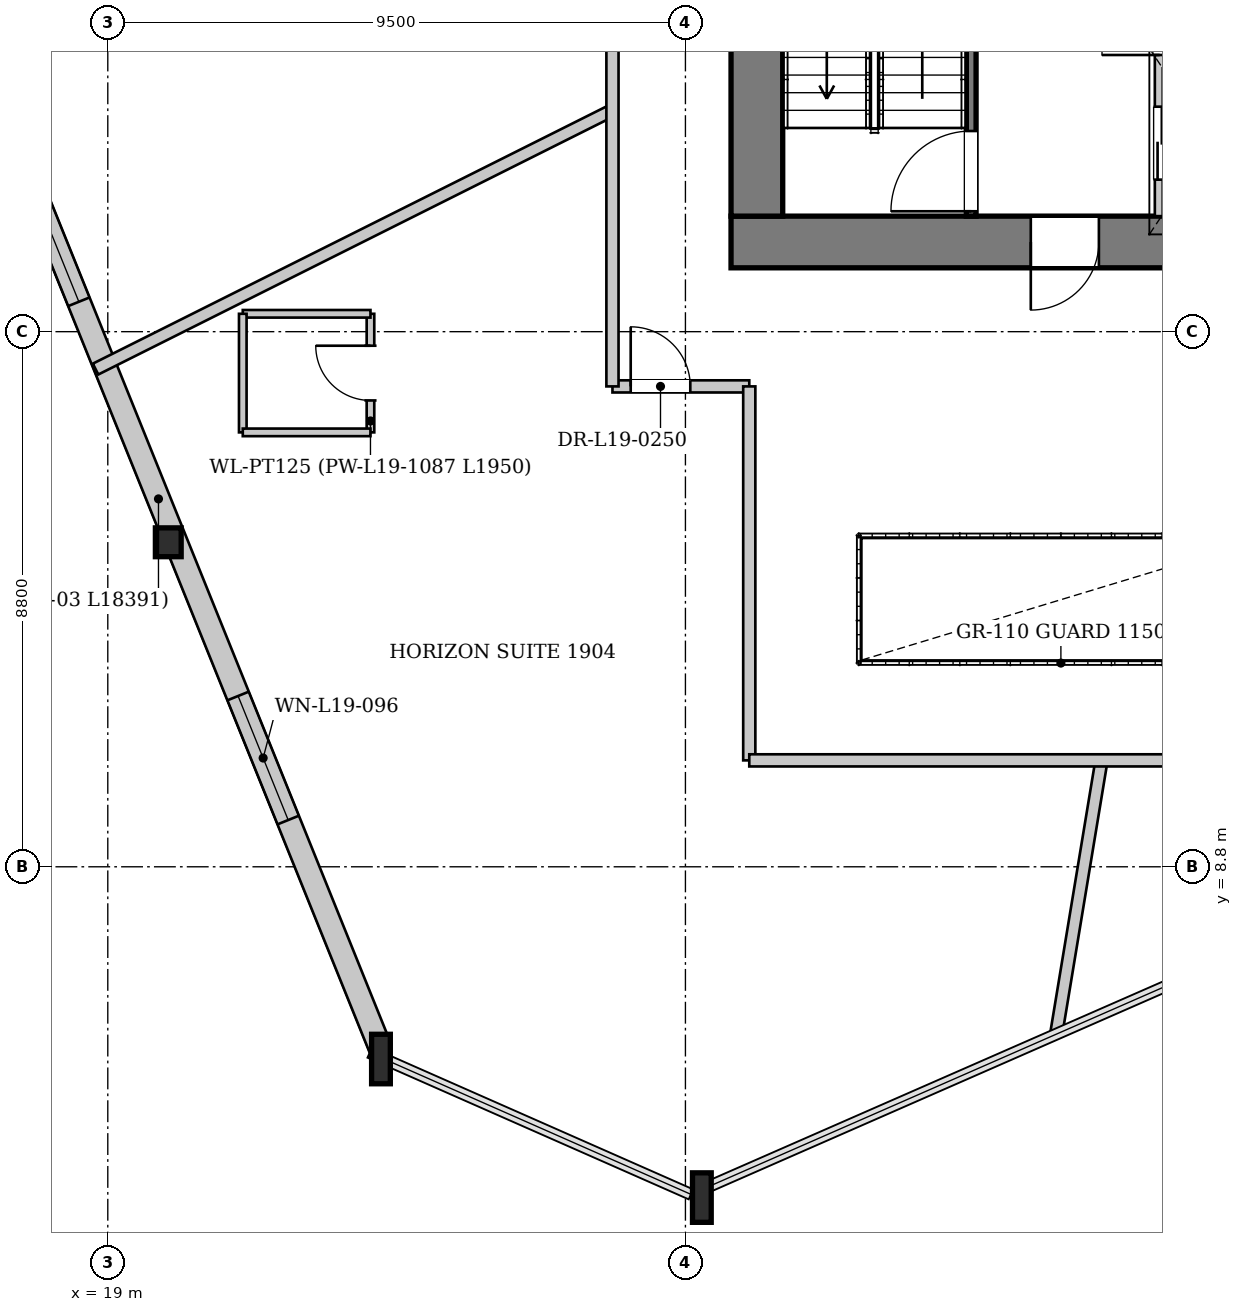
"""IFC4 building model, lengths in metres.
Left out: names, types, materials, properties, quantities, classifications, styles, units other than length and angle.
Written with IfcOpenShell. Run it as: python <this file> out.ifc"""

import sys

from ifc_helpers import new_model, si_unit, direction, frame, frame_2d, origin, origin_2d, place, context, subcontext, project, spatial, rectangle, i_section, extrude, source, transform, mapped, element, fill, save


model = new_model("IFC4")
c1 = context("Model", 3, precision=1e-05, world=origin(), true_north=direction((0.0, 1.0)))
c2 = subcontext(c1, "Body", "Model", "MODEL_VIEW")
j1 = project(units=[si_unit("LENGTHUNIT", "METRE"), si_unit("PLANEANGLEUNIT", "RADIAN")], contexts=[c1])
p1 = place(None, origin())
s1 = spatial("IfcSite", under=j1, at=p1, CompositionType="ELEMENT")
p2 = place(p1, origin())
s2 = spatial("IfcBuilding", under=s1, at=p2, CompositionType="ELEMENT")
p3 = place(p2, frame((0.0, 0.0, 75.9)))
s3 = spatial("IfcBuildingStorey", under=s2, at=p3, CompositionType="ELEMENT", Elevation=75.9)
m1 = source(origin(), c2, "Body", "SweptSolid", [
    extrude(i_section(OverallWidth=0.424, OverallDepth=0.474, WebThickness=0.043, FlangeThickness=0.068, at=origin_2d()), origin(), (0.0, 0.0, 1.0), 3.853),
])
p4 = place(p3, frame((19.863, 14.269, 0.0), z_axis=(0.068236458654, -0.068870037657, 0.995289256258), x_axis=(0.710366787942, 0.703831674897, 0.0)))
e1 = element("IfcColumn", 1, at=p4, inside=s3, PredefinedType="COLUMN", context=c2, shape_type="MappedRepresentation", body=[
    mapped(m1, transform((0.0, 0.0, 0.0), x_axis=(1.0, 0.0, 0.0), y_axis=(0.0, 1.0, 0.0), z_axis=(0.0, 0.0, 1.0), scale=1.0)),
])
m2 = source(origin(), c2, "Body", "SweptSolid", [
    extrude(i_section(OverallWidth=0.308, OverallDepth=0.814, WebThickness=0.021, FlangeThickness=0.04, at=origin_2d()), origin(), (0.0, 0.0, 1.0), 3.859),
])
p5 = place(p3, frame((23.307, 5.743, 0.0), z_axis=(0.096105328977, -0.054284642701, 0.993889804409), x_axis=(0.491811694225, 0.870701589193, 0.0)))
e2 = element("IfcColumn", 2, at=p5, inside=s3, PredefinedType="COLUMN", context=c2, shape_type="MappedRepresentation", body=[
    mapped(m2, transform((0.0, 0.0, 0.0), x_axis=(1.0, 0.0, 0.0), y_axis=(0.0, 1.0, 0.0), z_axis=(0.0, 0.0, 1.0), scale=1.0)),
])
m3 = source(origin(), c2, "Body", "SweptSolid", [
    extrude(i_section(OverallWidth=0.308, OverallDepth=0.814, WebThickness=0.021, FlangeThickness=0.04, at=origin_2d()), origin(), (0.0, 0.0, 1.0), 3.854),
])
p6 = place(p3, frame((28.59, 3.413, 0.0), z_axis=(0.093322917566, -0.027559721073, 0.995254386994), x_axis=(0.283223653581, 0.959053889024, 0.0)))
e3 = element("IfcColumn", 3, at=p6, inside=s3, PredefinedType="COLUMN", context=c2, shape_type="MappedRepresentation", body=[
    mapped(m3, transform((0.0, 0.0, 0.0), x_axis=(1.0, 0.0, 0.0), y_axis=(0.0, 1.0, 0.0), z_axis=(0.0, 0.0, 1.0), scale=1.0)),
])
p7 = place(p3, frame((23.483, 5.814, 0.0), z_axis=(0.0, 0.0, 1.0), x_axis=(-0.374542504412, 0.927209745629, 0.0)))
e4 = element("IfcWall", 4, at=p7, inside=s3, PredefinedType="SOLIDWALL", context=c2, shape_type="SweptSolid", body=[
    extrude(rectangle(XDim=18.391, YDim=0.38, at=frame_2d((9.195, 0.0))), origin(), (0.0, 0.0, 1.0), 2.872),
])
p8 = place(p7, frame((4.049, 0.0, 0.502)))
e5 = element("IfcOpeningElement", 5, at=p8, cuts=e4, PredefinedType="OPENING", context=c2, shape_type="SweptSolid", body=[
    extrude(rectangle(XDim=2.2, YDim=2.25, at=frame_2d((1.1, 1.125))), frame((0.0, 0.2, 0.0), z_axis=(0.0, -1.0, 0.0), x_axis=(1.0, 0.0, 0.0)), (0.0, 0.0, 1.0), 0.4),
])
p9 = place(p7, frame((13.241, 0.0, 0.502)))
e6 = element("IfcOpeningElement", 6, at=p9, cuts=e4, PredefinedType="OPENING", context=c2, shape_type="SweptSolid", body=[
    extrude(rectangle(XDim=2.2, YDim=2.25, at=frame_2d((1.1, 1.125))), frame((0.0, 0.2, 0.0), z_axis=(0.0, -1.0, 0.0), x_axis=(1.0, 0.0, 0.0)), (0.0, 0.0, 1.0), 0.4),
])
p10 = place(p3, frame((46.75, 19.075, 0.0), z_axis=(0.0, 0.0, 1.0), x_axis=(-1.0, 0.0, 0.0)))
e7 = element("IfcWall", 7, at=p10, inside=s3, PredefinedType="SHEAR", context=c2, shape_type="SweptSolid", body=[
    extrude(rectangle(XDim=17.5, YDim=0.85, at=frame_2d((8.75, 0.0))), origin(), (0.0, 0.0, 1.0), 3.58),
])
p11 = place(p10, frame((4.95, 0.0, 0.0)))
e8 = element("IfcOpeningElement", 8, at=p11, cuts=e7, PredefinedType="OPENING", context=c2, shape_type="SweptSolid", body=[
    extrude(rectangle(XDim=1.12, YDim=2.25, at=frame_2d((0.56, 1.125))), frame((0.0, 0.435, 0.0), z_axis=(0.0, -1.0, 0.0), x_axis=(1.0, 0.0, 0.0)), (0.0, 0.0, 1.0), 0.87),
])
p12 = place(p10, frame((11.45, 0.0, 0.0)))
e9 = element("IfcOpeningElement", 9, at=p12, cuts=e7, PredefinedType="OPENING", context=c2, shape_type="SweptSolid", body=[
    extrude(rectangle(XDim=1.12, YDim=2.25, at=frame_2d((0.56, 1.125))), frame((0.0, 0.435, 0.0), z_axis=(0.0, -1.0, 0.0), x_axis=(1.0, 0.0, 0.0)), (0.0, 0.0, 1.0), 0.87),
])
p13 = place(p3, frame((29.675, 19.5, 0.0), z_axis=(0.0, 0.0, 1.0), x_axis=(0.0, 1.0, 0.0)))
e10 = element("IfcWall", 10, at=p13, inside=s3, PredefinedType="SHEAR", context=c2, shape_type="SweptSolid", body=[
    extrude(rectangle(XDim=14.2, YDim=0.85, at=frame_2d((7.1, 0.0))), origin(), (0.0, 0.0, 1.0), 3.58),
])
p14 = place(p13, frame((7.42, 0.0, 0.0)))
e11 = element("IfcOpeningElement", 11, at=p14, cuts=e10, PredefinedType="OPENING", context=c2, shape_type="SweptSolid", body=[
    extrude(rectangle(XDim=1.6, YDim=2.2, at=frame_2d((0.8, 1.1))), frame((0.0, 0.435, 0.0), z_axis=(0.0, -1.0, 0.0), x_axis=(1.0, 0.0, 0.0)), (0.0, 0.0, 1.0), 0.87),
])
p15 = place(p3, frame((33.2, 19.5, 0.0), z_axis=(0.0, 0.0, 1.0), x_axis=(0.0, 1.0, 0.0)))
e12 = element("IfcWall", 12, at=p15, inside=s3, PredefinedType="PARTITIONING", context=c2, shape_type="SweptSolid", body=[
    extrude(rectangle(XDim=7.46, YDim=0.16, at=frame_2d((3.73, 0.0))), origin(), (0.0, 0.0, 1.0), 3.58),
])
p16 = place(p15, frame((0.08, 0.0, 0.0)))
e13 = element("IfcOpeningElement", 13, at=p16, cuts=e12, PredefinedType="OPENING", context=c2, shape_type="SweptSolid", body=[
    extrude(rectangle(XDim=1.32, YDim=2.2, at=frame_2d((0.66, 1.1))), frame((0.0, 0.09, 0.0), z_axis=(0.0, -1.0, 0.0), x_axis=(1.0, 0.0, 0.0)), (0.0, 0.0, 1.0), 0.18),
])
p17 = place(p3, frame((36.3, 19.5, 0.0), z_axis=(0.0, 0.0, 1.0), x_axis=(0.0, 1.0, 0.0)))
e14 = element("IfcWall", 14, at=p17, inside=s3, PredefinedType="PARTITIONING", context=c2, shape_type="SweptSolid", body=[
    extrude(rectangle(XDim=4.78, YDim=0.16, at=frame_2d((2.39, 0.0))), origin(), (0.0, 0.0, 1.0), 3.58),
])
p18 = place(p17, frame((0.6, 0.0, 0.0)))
e15 = element("IfcOpeningElement", 15, at=p18, cuts=e14, PredefinedType="OPENING", context=c2, shape_type="SweptSolid", body=[
    extrude(rectangle(XDim=1.2, YDim=2.2, at=frame_2d((0.6, 1.1))), frame((0.0, 0.09, 0.0), z_axis=(0.0, -1.0, 0.0), x_axis=(1.0, 0.0, 0.0)), (0.0, 0.0, 1.0), 0.18),
])
p19 = place(p17, frame((2.65, 0.0, 0.0)))
e16 = element("IfcOpeningElement", 16, at=p19, cuts=e14, PredefinedType="OPENING", context=c2, shape_type="SweptSolid", body=[
    extrude(rectangle(XDim=0.95, YDim=2.1, at=frame_2d((0.475, 1.05))), frame((0.0, 0.09, 0.0), z_axis=(0.0, -1.0, 0.0), x_axis=(1.0, 0.0, 0.0)), (0.0, 0.0, 1.0), 0.18),
])
p20 = place(p3, frame((27.3, 21.242, 0.0), z_axis=(0.0, 0.0, 1.0), x_axis=(-0.894159980133, -0.447747618562, 0.0)))
e17 = element("IfcWall", 17, at=p20, inside=s3, PredefinedType="PARTITIONING", context=c2, shape_type="SweptSolid", body=[
    extrude(rectangle(XDim=9.508, YDim=0.2, at=frame_2d((4.754, 0.0))), origin(), (0.0, 0.0, 1.0), 3.58),
])
p21 = place(p3, frame((35.343, 10.55, 0.0), z_axis=(0.0, 0.0, 1.0), x_axis=(-0.163323758673, -0.986572526403, 0.0)))
e18 = element("IfcWall", 18, at=p21, inside=s3, PredefinedType="PARTITIONING", context=c2, shape_type="SweptSolid", body=[
    extrude(rectangle(XDim=4.529, YDim=0.2, at=frame_2d((2.265, 0.0))), origin(), (0.0, 0.0, 1.0), 3.58),
])
p22 = place(p3, frame((23.32, 15.944, 0.0), z_axis=(0.0, 0.0, 1.0), x_axis=(0.0, 1.0, 0.0)))
e19 = element("IfcWall", 19, at=p22, inside=s3, PredefinedType="PARTITIONING", context=c2, shape_type="SweptSolid", body=[
    extrude(rectangle(XDim=1.95, YDim=0.125, at=frame_2d((0.975, 0.0))), origin(), (0.0, 0.0, 1.0), 3.58),
])
p23 = place(p22, frame((0.525, 0.0, 0.0)))
e20 = element("IfcOpeningElement", 20, at=p23, cuts=e19, PredefinedType="OPENING", context=c2, shape_type="SweptSolid", body=[
    extrude(rectangle(XDim=0.9, YDim=2.1, at=frame_2d((0.45, 1.05))), frame((0.0, 0.073, 0.0), z_axis=(0.0, -1.0, 0.0), x_axis=(1.0, 0.0, 0.0)), (0.0, 0.0, 1.0), 0.145),
])
p24 = place(p3, frame((23.32, 17.894, 0.0), z_axis=(0.0, 0.0, 1.0), x_axis=(-1.0, 0.0, 0.0)))
e21 = element("IfcWall", 21, at=p24, inside=s3, PredefinedType="PARTITIONING", context=c2, shape_type="SweptSolid", body=[
    extrude(rectangle(XDim=2.1, YDim=0.125, at=frame_2d((1.05, 0.0))), origin(), (0.0, 0.0, 1.0), 3.58),
])
p25 = place(p3, frame((21.22, 17.894, 0.0), z_axis=(0.0, 0.0, 1.0), x_axis=(0.0, -1.0, 0.0)))
e22 = element("IfcWall", 22, at=p25, inside=s3, PredefinedType="PARTITIONING", context=c2, shape_type="SweptSolid", body=[
    extrude(rectangle(XDim=1.95, YDim=0.125, at=frame_2d((0.975, 0.0))), origin(), (0.0, 0.0, 1.0), 3.58),
])
p26 = place(p3, frame((21.22, 15.944, 0.0), z_axis=(0.0, 0.0, 1.0), x_axis=(1.0, 0.0, 0.0)))
e23 = element("IfcWall", 23, at=p26, inside=s3, PredefinedType="PARTITIONING", context=c2, shape_type="SweptSolid", body=[
    extrude(rectangle(XDim=2.1, YDim=0.125, at=frame_2d((1.05, 0.0))), origin(), (0.0, 0.0, 1.0), 3.58),
])
p27 = place(p3, frame((27.3, 16.7, 0.0), z_axis=(0.0, 0.0, 1.0), x_axis=(1.0, 0.0, 0.0)))
e24 = element("IfcWall", 24, at=p27, inside=s3, PredefinedType="PARTITIONING", context=c2, shape_type="SweptSolid", body=[
    extrude(rectangle(XDim=2.25, YDim=0.2, at=frame_2d((1.125, 0.0))), origin(), (0.0, 0.0, 1.0), 3.58),
])
p28 = place(p27, frame((0.3, 0.0, 0.0)))
e25 = element("IfcOpeningElement", 25, at=p28, cuts=e24, PredefinedType="OPENING", context=c2, shape_type="SweptSolid", body=[
    extrude(rectangle(XDim=0.98, YDim=2.15, at=frame_2d((0.49, 1.075))), frame((0.0, 0.11, 0.0), z_axis=(0.0, -1.0, 0.0), x_axis=(1.0, 0.0, 0.0)), (0.0, 0.0, 1.0), 0.22),
])
p29 = place(p3, frame((27.3, 16.7, 0.0), z_axis=(0.0, 0.0, 1.0), x_axis=(0.0, 1.0, 0.0)))
e26 = element("IfcWall", 26, at=p29, inside=s3, PredefinedType="PARTITIONING", context=c2, shape_type="SweptSolid", body=[
    extrude(rectangle(XDim=19.8, YDim=0.2, at=frame_2d((9.9, 0.0))), origin(), (0.0, 0.0, 1.0), 3.58),
])
p30 = place(p29, frame((18.52, 0.0, 0.0)))
e27 = element("IfcOpeningElement", 27, at=p30, cuts=e26, PredefinedType="OPENING", context=c2, shape_type="SweptSolid", body=[
    extrude(rectangle(XDim=0.98, YDim=2.15, at=frame_2d((0.49, 1.075))), frame((0.0, 0.11, 0.0), z_axis=(0.0, -1.0, 0.0), x_axis=(1.0, 0.0, 0.0)), (0.0, 0.0, 1.0), 0.22),
])
p31 = place(p29, frame((10.098, 0.0, 0.0)))
e28 = element("IfcOpeningElement", 28, at=p31, cuts=e26, PredefinedType="OPENING", context=c2, shape_type="SweptSolid", body=[
    extrude(rectangle(XDim=0.98, YDim=2.15, at=frame_2d((0.49, 1.075))), frame((0.0, 0.11, 0.0), z_axis=(0.0, -1.0, 0.0), x_axis=(1.0, 0.0, 0.0)), (0.0, 0.0, 1.0), 0.22),
])
p32 = place(p3, frame((29.55, 10.55, 0.0), z_axis=(0.0, 0.0, 1.0), x_axis=(0.0, 1.0, 0.0)))
e29 = element("IfcWall", 29, at=p32, inside=s3, PredefinedType="PARTITIONING", context=c2, shape_type="SweptSolid", body=[
    extrude(rectangle(XDim=6.15, YDim=0.2, at=frame_2d((3.075, 0.0))), origin(), (0.0, 0.0, 1.0), 3.58),
])
p33 = place(p3, frame((29.55, 10.55, 0.0), z_axis=(0.0, 0.0, 1.0), x_axis=(1.0, 0.0, 0.0)))
e30 = element("IfcWall", 30, at=p33, inside=s3, PredefinedType="PARTITIONING", context=c2, shape_type="SweptSolid", body=[
    extrude(rectangle(XDim=10.3, YDim=0.2, at=frame_2d((5.15, 0.0))), origin(), (0.0, 0.0, 1.0), 3.205),
])
m4 = source(origin(), c2, "Body", "SweptSolid", [
    extrude(rectangle(XDim=2.2, YDim=2.25, at=frame_2d((1.1, 1.125))), frame((0.0, 0.03, 0.0), z_axis=(0.0, -1.0, 0.0), x_axis=(1.0, 0.0, 0.0)), (0.0, 0.0, 1.0), 0.06),
])
p34 = place(p8, origin())
e31 = element("IfcWindow", 31, at=p34, inside=s3, PartitioningType="SINGLE_PANEL", PredefinedType="WINDOW", context=c2, shape_type="MappedRepresentation", body=[
    mapped(m4, transform((0.0, 0.0, 0.0), x_axis=(1.0, 0.0, 0.0), y_axis=(0.0, 1.0, 0.0), z_axis=(0.0, 0.0, 1.0), scale=1.0)),
])
fill(e5, e31)
p35 = place(p9, origin())
e32 = element("IfcWindow", 32, at=p35, inside=s3, PartitioningType="SINGLE_PANEL", PredefinedType="WINDOW", context=c2, shape_type="MappedRepresentation", body=[
    mapped(m4, transform((0.0, 0.0, 0.0), x_axis=(1.0, 0.0, 0.0), y_axis=(0.0, 1.0, 0.0), z_axis=(0.0, 0.0, 1.0), scale=1.0)),
])
fill(e6, e32)
m5 = source(origin(), c2, "Body", "SweptSolid", [
    extrude(rectangle(XDim=1.12, YDim=2.25, at=frame_2d((0.56, 1.125))), frame((0.0, 0.025, 0.0), z_axis=(0.0, -1.0, 0.0), x_axis=(1.0, 0.0, 0.0)), (0.0, 0.0, 1.0), 0.05),
])
p36 = place(p12, origin())
e33 = element("IfcDoor", 33, at=p36, inside=s3, OperationType="SINGLE_SWING_RIGHT", PredefinedType="DOOR", context=c2, shape_type="MappedRepresentation", body=[
    mapped(m5, transform((0.0, 0.0, 0.0), x_axis=(1.0, 0.0, 0.0), y_axis=(0.0, 1.0, 0.0), z_axis=(0.0, 0.0, 1.0), scale=1.0)),
])
fill(e9, e33)
m6 = source(origin(), c2, "Body", "SweptSolid", [
    extrude(rectangle(XDim=1.32, YDim=2.2, at=frame_2d((0.66, 1.1))), frame((0.0, 0.025, 0.0), z_axis=(0.0, -1.0, 0.0), x_axis=(1.0, 0.0, 0.0)), (0.0, 0.0, 1.0), 0.05),
])
p37 = place(p16, origin())
e34 = element("IfcDoor", 34, at=p37, inside=s3, OperationType="SINGLE_SWING_LEFT", PredefinedType="DOOR", context=c2, shape_type="MappedRepresentation", body=[
    mapped(m6, transform((0.0, 0.0, 0.0), x_axis=(1.0, 0.0, 0.0), y_axis=(0.0, 1.0, 0.0), z_axis=(0.0, 0.0, 1.0), scale=1.0)),
])
fill(e13, e34)
m7 = source(origin(), c2, "Body", "SweptSolid", [
    extrude(rectangle(XDim=1.2, YDim=2.2, at=frame_2d((0.6, 1.1))), frame((0.0, 0.025, 0.0), z_axis=(0.0, -1.0, 0.0), x_axis=(1.0, 0.0, 0.0)), (0.0, 0.0, 1.0), 0.05),
])
p38 = place(p18, origin())
e35 = element("IfcDoor", 35, at=p38, inside=s3, OperationType="DOUBLE_DOOR_SLIDING", PredefinedType="DOOR", context=c2, shape_type="MappedRepresentation", body=[
    mapped(m7, transform((0.0, 0.0, 0.0), x_axis=(1.0, 0.0, 0.0), y_axis=(0.0, 1.0, 0.0), z_axis=(0.0, 0.0, 1.0), scale=1.0)),
])
fill(e15, e35)
m8 = source(origin(), c2, "Body", "SweptSolid", [
    extrude(rectangle(XDim=0.95, YDim=2.1, at=frame_2d((0.475, 1.05))), frame((0.0, 0.025, 0.0), z_axis=(0.0, -1.0, 0.0), x_axis=(1.0, 0.0, 0.0)), (0.0, 0.0, 1.0), 0.05),
])
p39 = place(p19, origin())
e36 = element("IfcDoor", 36, at=p39, inside=s3, OperationType="SINGLE_SWING_LEFT", PredefinedType="DOOR", context=c2, shape_type="MappedRepresentation", body=[
    mapped(m8, transform((0.0, 0.0, 0.0), x_axis=(1.0, 0.0, 0.0), y_axis=(0.0, 1.0, 0.0), z_axis=(0.0, 0.0, 1.0), scale=1.0)),
])
fill(e16, e36)
m9 = source(origin(), c2, "Body", "SweptSolid", [
    extrude(rectangle(XDim=0.9, YDim=2.1, at=frame_2d((0.45, 1.05))), frame((0.0, 0.025, 0.0), z_axis=(0.0, -1.0, 0.0), x_axis=(1.0, 0.0, 0.0)), (0.0, 0.0, 1.0), 0.05),
])
p40 = place(p23, origin())
e37 = element("IfcDoor", 37, at=p40, inside=s3, OperationType="SINGLE_SWING_RIGHT", PredefinedType="DOOR", context=c2, shape_type="MappedRepresentation", body=[
    mapped(m9, transform((0.0, 0.0, 0.0), x_axis=(1.0, 0.0, 0.0), y_axis=(0.0, 1.0, 0.0), z_axis=(0.0, 0.0, 1.0), scale=1.0)),
])
fill(e20, e37)
m10 = source(origin(), c2, "Body", "SweptSolid", [
    extrude(rectangle(XDim=0.98, YDim=2.15, at=frame_2d((0.49, 1.075))), frame((0.0, 0.025, 0.0), z_axis=(0.0, -1.0, 0.0), x_axis=(1.0, 0.0, 0.0)), (0.0, 0.0, 1.0), 0.05),
])
p41 = place(p28, origin())
e38 = element("IfcDoor", 38, at=p41, inside=s3, OperationType="SINGLE_SWING_LEFT", PredefinedType="DOOR", context=c2, shape_type="MappedRepresentation", body=[
    mapped(m10, transform((0.0, 0.0, 0.0), x_axis=(1.0, 0.0, 0.0), y_axis=(0.0, 1.0, 0.0), z_axis=(0.0, 0.0, 1.0), scale=1.0)),
])
fill(e25, e38)
save(model, sys.argv[1])
